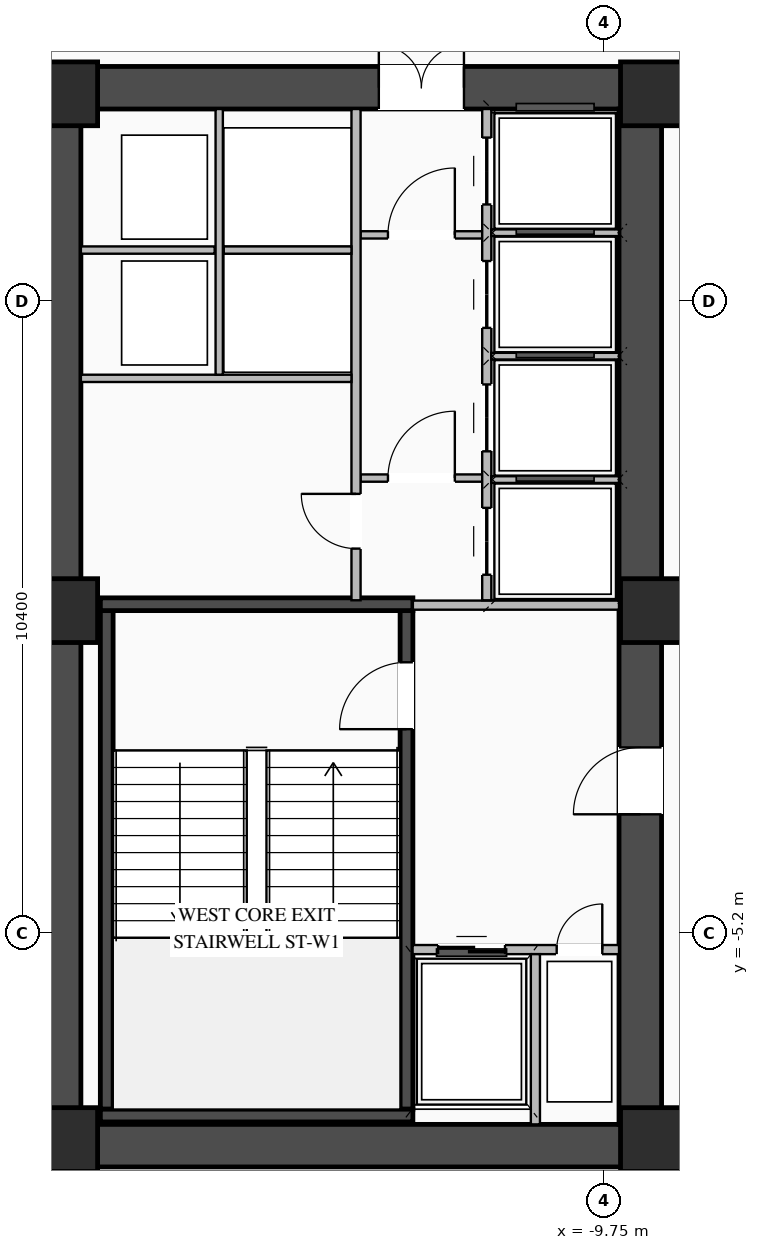
"""IFC4 building model, lengths in metres.
Left out: names, types, materials, properties, quantities, classifications, styles, units other than length and angle.
Written with IfcOpenShell. Run it as: python <this file> out.ifc"""

import sys

from ifc_helpers import new_model, si_unit, direction, frame, frame_2d, origin, origin_2d, place, context, subcontext, project, spatial, rectangle, extrude, element, fill, save


model = new_model("IFC4")
c1 = context("Model", 3, precision=1e-05, world=origin(), true_north=direction((0.0, 1.0)))
c2 = subcontext(c1, "Body", "Model", "MODEL_VIEW")
j1 = project(units=[si_unit("LENGTHUNIT", "METRE"), si_unit("PLANEANGLEUNIT", "RADIAN")], contexts=[c1])
p1 = place(None, origin())
s1 = spatial("IfcSite", under=j1, at=p1, CompositionType="ELEMENT")
p2 = place(p1, origin())
s2 = spatial("IfcBuilding", under=s1, at=p2, CompositionType="ELEMENT")
p3 = place(p2, frame((0.0, 0.0, 70.0)))
s3 = spatial("IfcBuildingStorey", under=s2, at=p3, CompositionType="ELEMENT", Elevation=70.0)
p4 = place(p3, frame((-19.05, -8.7, 0.0), z_axis=(0.0, 0.0, 1.0), x_axis=(1.0, 0.0, 0.0)))
e1 = element("IfcWall", 1, at=p4, inside=s3, PredefinedType="SHEAR", context=c2, shape_type="SweptSolid", body=[
    extrude(rectangle(XDim=10.25, YDim=0.7, at=frame_2d((5.125, 0.0))), origin(), (0.0, 0.0, 1.0), 4.02),
])
p5 = place(p3, frame((-19.05, 8.7, 0.0), z_axis=(0.0, 0.0, 1.0), x_axis=(1.0, 0.0, 0.0)))
e2 = element("IfcWall", 2, at=p5, inside=s3, PredefinedType="SHEAR", context=c2, shape_type="SweptSolid", body=[
    extrude(rectangle(XDim=10.25, YDim=0.7, at=frame_2d((5.125, 0.0))), origin(), (0.0, 0.0, 1.0), 4.02),
])
p6 = place(p5, frame((5.6, 0.0, 0.0)))
e3 = element("IfcOpeningElement", 3, at=p6, cuts=e2, PredefinedType="OPENING", context=c2, shape_type="SweptSolid", body=[
    extrude(rectangle(XDim=1.4, YDim=2.05, at=frame_2d((0.7, 1.025))), frame((0.0, 0.36, 0.0), z_axis=(0.0, -1.0, 0.0), x_axis=(1.0, 0.0, 0.0)), (0.0, 0.0, 1.0), 0.72),
])
p7 = place(p3, frame((-18.7, -8.35, 0.0), z_axis=(0.0, 0.0, 1.0), x_axis=(0.0, 1.0, 0.0)))
e4 = element("IfcWall", 4, at=p7, inside=s3, PredefinedType="SHEAR", context=c2, shape_type="SweptSolid", body=[
    extrude(rectangle(XDim=16.7, YDim=0.7, at=frame_2d((8.35, 0.0))), origin(), (0.0, 0.0, 1.0), 4.02),
])
p8 = place(p3, frame((-9.15, -8.35, 0.0), z_axis=(0.0, 0.0, 1.0), x_axis=(0.0, 1.0, 0.0)))
e5 = element("IfcWall", 5, at=p8, inside=s3, PredefinedType="SHEAR", context=c2, shape_type="SweptSolid", body=[
    extrude(rectangle(XDim=16.7, YDim=0.7, at=frame_2d((8.35, 0.0))), origin(), (0.0, 0.0, 1.0), 4.02),
])
p9 = place(p8, frame((5.1, 0.0, 0.0)))
e6 = element("IfcOpeningElement", 6, at=p9, cuts=e5, PredefinedType="OPENING", context=c2, shape_type="SweptSolid", body=[
    extrude(rectangle(XDim=1.1, YDim=2.08, at=frame_2d((0.55, 1.04))), frame((0.0, 0.36, 0.0), z_axis=(0.0, -1.0, 0.0), x_axis=(1.0, 0.0, 0.0)), (0.0, 0.0, 1.0), 0.72),
])
p10 = place(p3, frame((-12.995, -8.1, 0.0), z_axis=(0.0, 0.0, 1.0), x_axis=(0.0, 1.0, 0.0)))
e7 = element("IfcWall", 7, at=p10, inside=s3, PredefinedType="SHEAR", context=c2, shape_type="SweptSolid", body=[
    extrude(rectangle(XDim=8.2, YDim=0.21, at=frame_2d((4.1, 0.0))), origin(), (0.0, 0.0, 1.0), 4.02),
])
p11 = place(p10, frame((6.25, 0.0, 0.0)))
e8 = element("IfcOpeningElement", 8, at=p11, cuts=e7, PredefinedType="OPENING", context=c2, shape_type="SweptSolid", body=[
    extrude(rectangle(XDim=1.1, YDim=2.15, at=frame_2d((0.55, 1.075))), frame((0.0, 0.115, 0.0), z_axis=(0.0, -1.0, 0.0), x_axis=(1.0, 0.0, 0.0)), (0.0, 0.0, 1.0), 0.23),
])
p12 = place(p3, frame((-17.925, -8.1, 0.0), z_axis=(0.0, 0.0, 1.0), x_axis=(0.0, 1.0, 0.0)))
e9 = element("IfcWall", 9, at=p12, inside=s3, PredefinedType="SHEAR", context=c2, shape_type="SweptSolid", body=[
    extrude(rectangle(XDim=8.2, YDim=0.21, at=frame_2d((4.1, 0.0))), origin(), (0.0, 0.0, 1.0), 4.02),
])
for number, where, z_axis, x_axis in (
    (10, (-18.03, -8.205, 0.0), (0.0, 0.0, 1.0), (1.0, 0.0, 0.0)),
    (11, (-12.89, 0.205, 0.0), (0.0, 0.0, 1.0), (-1.0, 0.0, 0.0)),
):
    element("IfcWall", number, at=place(p3, frame(where, z_axis=z_axis, x_axis=x_axis)), inside=s3, PredefinedType="SHEAR", context=c2, shape_type="SweptSolid", body=[
        extrude(rectangle(XDim=5.14, YDim=0.21, at=frame_2d((2.57, 0.0))), origin(), (0.0, 0.0, 1.0), 4.02),
    ])
for number, where, z_axis, x_axis in (
    (12, (-8.95, -8.6, 0.0), (0.0, 0.0, 1.0), (1.0, 0.0, 0.0)),
    (13, (-8.95, 0.1, 0.0), (0.0, 0.0, 1.0), (1.0, 0.0, 0.0)),
    (14, (-8.95, 8.6, 0.0), (0.0, 0.0, 1.0), (1.0, 0.0, 0.0)),
    (15, (-18.6, -8.6, 0.0), (0.0, 0.0, 1.0), (1.0, 0.0, 0.0)),
    (16, (-18.6, 0.1, 0.0), (0.0, 0.0, 1.0), (1.0, 0.0, 0.0)),
    (17, (-18.6, 8.6, 0.0), (0.0, 0.0, 1.0), (1.0, 0.0, 0.0)),
):
    element("IfcColumn", number, at=place(p3, frame(where, z_axis=z_axis, x_axis=x_axis)), inside=s3, PredefinedType="COLUMN", context=c2, shape_type="SweptSolid", body=[
        extrude(rectangle(XDim=1.05, YDim=1.05, at=origin_2d()), origin(), (0.0, 0.0, 1.0), 4.2),
    ])
p13 = place(p3, frame((-12.895, -5.475, 0.0), z_axis=(0.0, 0.0, 1.0), x_axis=(1.0, 0.0, 0.0)))
e18 = element("IfcWall", 18, at=p13, inside=s3, PredefinedType="STANDARD", context=c2, shape_type="SweptSolid", body=[
    extrude(rectangle(XDim=3.395, YDim=0.15, at=frame_2d((1.698, 0.0))), origin(), (0.0, 0.0, 1.0), 4.0),
])
p14 = place(p13, frame((0.42, 0.0, 0.0)))
e19 = element("IfcOpeningElement", 19, at=p14, cuts=e18, PredefinedType="OPENING", context=c2, shape_type="SweptSolid", body=[
    extrude(rectangle(XDim=1.1, YDim=2.15, at=frame_2d((0.55, 1.075))), frame((0.0, 0.085, 0.0), z_axis=(0.0, -1.0, 0.0), x_axis=(1.0, 0.0, 0.0)), (0.0, 0.0, 1.0), 0.17),
])
p15 = place(p13, frame((2.37, 0.0, 0.0)))
e20 = element("IfcOpeningElement", 20, at=p15, cuts=e18, PredefinedType="OPENING", context=c2, shape_type="SweptSolid", body=[
    extrude(rectangle(XDim=0.75, YDim=2.05, at=frame_2d((0.375, 1.025))), frame((0.0, 0.085, 0.0), z_axis=(0.0, -1.0, 0.0), x_axis=(1.0, 0.0, 0.0)), (0.0, 0.0, 1.0), 0.17),
])
p16 = place(p3, frame((-10.875, -8.35, 0.0), z_axis=(0.0, 0.0, 1.0), x_axis=(0.0, 1.0, 0.0)))
e21 = element("IfcWall", 21, at=p16, inside=s3, PredefinedType="STANDARD", context=c2, shape_type="SweptSolid", body=[
    extrude(rectangle(XDim=2.8, YDim=0.15, at=frame_2d((1.4, 0.0))), origin(), (0.0, 0.0, 1.0), 4.0),
])
p17 = place(p3, frame((-12.89, 0.19, 0.0), z_axis=(0.0, 0.0, 1.0), x_axis=(1.0, 0.0, 0.0)))
e22 = element("IfcWall", 22, at=p17, inside=s3, PredefinedType="STANDARD", context=c2, shape_type="SweptSolid", body=[
    extrude(rectangle(XDim=3.39, YDim=0.15, at=frame_2d((1.695, 0.0))), origin(), (0.0, 0.0, 1.0), 3.395),
])
p18 = place(p3, frame((-13.75, 2.28, 0.0), z_axis=(0.0, 0.0, 1.0), x_axis=(1.0, 0.0, 0.0)))
e23 = element("IfcWall", 23, at=p18, inside=s3, PredefinedType="STANDARD", context=c2, shape_type="SweptSolid", body=[
    extrude(rectangle(XDim=2.0, YDim=0.12, at=frame_2d((1.0, 0.0))), origin(), (0.0, 0.0, 1.0), 4.0),
])
p19 = place(p18, frame((0.45, 0.0, 0.0)))
e24 = element("IfcOpeningElement", 24, at=p19, cuts=e23, PredefinedType="OPENING", context=c2, shape_type="SweptSolid", body=[
    extrude(rectangle(XDim=1.1, YDim=2.1, at=frame_2d((0.55, 1.05))), frame((0.0, 0.07, 0.0), z_axis=(0.0, -1.0, 0.0), x_axis=(1.0, 0.0, 0.0)), (0.0, 0.0, 1.0), 0.14),
])
p20 = place(p3, frame((-13.75, 6.28, 0.0), z_axis=(0.0, 0.0, 1.0), x_axis=(1.0, 0.0, 0.0)))
e25 = element("IfcWall", 25, at=p20, inside=s3, PredefinedType="STANDARD", context=c2, shape_type="SweptSolid", body=[
    extrude(rectangle(XDim=2.0, YDim=0.12, at=frame_2d((1.0, 0.0))), origin(), (0.0, 0.0, 1.0), 4.0),
])
p21 = place(p20, frame((0.45, 0.0, 0.0)))
e26 = element("IfcOpeningElement", 26, at=p21, cuts=e25, PredefinedType="OPENING", context=c2, shape_type="SweptSolid", body=[
    extrude(rectangle(XDim=1.1, YDim=2.1, at=frame_2d((0.55, 1.05))), frame((0.0, 0.07, 0.0), z_axis=(0.0, -1.0, 0.0), x_axis=(1.0, 0.0, 0.0)), (0.0, 0.0, 1.0), 0.14),
])
p22 = place(p3, frame((-11.675, 0.27, 0.0), z_axis=(0.0, 0.0, 1.0), x_axis=(0.0, 1.0, 0.0)))
e27 = element("IfcWall", 27, at=p22, inside=s3, PredefinedType="STANDARD", context=c2, shape_type="SweptSolid", body=[
    extrude(rectangle(XDim=8.08, YDim=0.15, at=frame_2d((4.04, 0.0))), origin(), (0.0, 0.0, 1.0), 4.0),
])
p23 = place(p22, frame((0.42, 0.0, 0.0)))
e28 = element("IfcOpeningElement", 28, at=p23, cuts=e27, PredefinedType="OPENING", context=c2, shape_type="SweptSolid", body=[
    extrude(rectangle(XDim=1.1, YDim=2.1, at=frame_2d((0.55, 1.05))), frame((0.0, 0.085, 0.0), z_axis=(0.0, -1.0, 0.0), x_axis=(1.0, 0.0, 0.0)), (0.0, 0.0, 1.0), 0.17),
])
p24 = place(p22, frame((2.45, 0.0, 0.0)))
e29 = element("IfcOpeningElement", 29, at=p24, cuts=e27, PredefinedType="OPENING", context=c2, shape_type="SweptSolid", body=[
    extrude(rectangle(XDim=1.1, YDim=2.1, at=frame_2d((0.55, 1.05))), frame((0.0, 0.085, 0.0), z_axis=(0.0, -1.0, 0.0), x_axis=(1.0, 0.0, 0.0)), (0.0, 0.0, 1.0), 0.17),
])
p25 = place(p22, frame((4.48, 0.0, 0.0)))
e30 = element("IfcOpeningElement", 30, at=p25, cuts=e27, PredefinedType="OPENING", context=c2, shape_type="SweptSolid", body=[
    extrude(rectangle(XDim=1.1, YDim=2.1, at=frame_2d((0.55, 1.05))), frame((0.0, 0.085, 0.0), z_axis=(0.0, -1.0, 0.0), x_axis=(1.0, 0.0, 0.0)), (0.0, 0.0, 1.0), 0.17),
])
p26 = place(p22, frame((6.51, 0.0, 0.0)))
e31 = element("IfcOpeningElement", 31, at=p26, cuts=e27, PredefinedType="OPENING", context=c2, shape_type="SweptSolid", body=[
    extrude(rectangle(XDim=1.1, YDim=2.1, at=frame_2d((0.55, 1.05))), frame((0.0, 0.085, 0.0), z_axis=(0.0, -1.0, 0.0), x_axis=(1.0, 0.0, 0.0)), (0.0, 0.0, 1.0), 0.17),
])
for number, where, z_axis, x_axis in (
    (32, (-11.6, 2.255, 0.0), (0.0, 0.0, 1.0), (1.0, 0.0, 0.0)),
    (33, (-11.6, 4.285, 0.0), (0.0, 0.0, 1.0), (1.0, 0.0, 0.0)),
    (34, (-11.6, 6.315, 0.0), (0.0, 0.0, 1.0), (1.0, 0.0, 0.0)),
):
    element("IfcWall", number, at=place(p3, frame(where, z_axis=z_axis, x_axis=x_axis)), inside=s3, PredefinedType="STANDARD", context=c2, shape_type="SweptSolid", body=[
        extrude(rectangle(XDim=2.1, YDim=0.11, at=frame_2d((1.05, 0.0))), origin(), (0.0, 0.0, 1.0), 4.0),
    ])
p27 = place(p3, frame((-13.825, 0.27, 0.0), z_axis=(0.0, 0.0, 1.0), x_axis=(0.0, 1.0, 0.0)))
e35 = element("IfcWall", 35, at=p27, inside=s3, PredefinedType="STANDARD", context=c2, shape_type="SweptSolid", body=[
    extrude(rectangle(XDim=8.08, YDim=0.15, at=frame_2d((4.04, 0.0))), origin(), (0.0, 0.0, 1.0), 4.0),
])
p28 = place(p27, frame((0.85, 0.0, 0.0)))
e36 = element("IfcOpeningElement", 36, at=p28, cuts=e35, PredefinedType="OPENING", context=c2, shape_type="SweptSolid", body=[
    extrude(rectangle(XDim=0.9, YDim=2.05, at=frame_2d((0.45, 1.025))), frame((0.0, 0.085, 0.0), z_axis=(0.0, -1.0, 0.0), x_axis=(1.0, 0.0, 0.0)), (0.0, 0.0, 1.0), 0.17),
])
p29 = place(p3, frame((-18.35, 3.92, 0.0), z_axis=(0.0, 0.0, 1.0), x_axis=(1.0, 0.0, 0.0)))
e37 = element("IfcWall", 37, at=p29, inside=s3, PredefinedType="STANDARD", context=c2, shape_type="SweptSolid", body=[
    extrude(rectangle(XDim=4.45, YDim=0.12, at=frame_2d((2.225, 0.0))), origin(), (0.0, 0.0, 1.0), 4.0),
])
p30 = place(p3, frame((-18.35, 6.03, 0.0), z_axis=(0.0, 0.0, 1.0), x_axis=(1.0, 0.0, 0.0)))
e38 = element("IfcWall", 38, at=p30, inside=s3, PredefinedType="STANDARD", context=c2, shape_type="SweptSolid", body=[
    extrude(rectangle(XDim=2.2, YDim=0.12, at=frame_2d((1.1, 0.0))), origin(), (0.0, 0.0, 1.0), 4.0),
])
p31 = place(p3, frame((-16.075, 3.98, 0.0), z_axis=(0.0, 0.0, 1.0), x_axis=(0.0, 1.0, 0.0)))
e39 = element("IfcWall", 39, at=p31, inside=s3, PredefinedType="STANDARD", context=c2, shape_type="SweptSolid", body=[
    extrude(rectangle(XDim=4.37, YDim=0.12, at=frame_2d((2.185, 0.0))), origin(), (0.0, 0.0, 1.0), 4.0),
])
p32 = place(p3, frame((-16.0, 6.03, 0.0), z_axis=(0.0, 0.0, 1.0), x_axis=(1.0, 0.0, 0.0)))
e40 = element("IfcWall", 40, at=p32, inside=s3, PredefinedType="STANDARD", context=c2, shape_type="SweptSolid", body=[
    extrude(rectangle(XDim=2.1, YDim=0.12, at=frame_2d((1.05, 0.0))), origin(), (0.0, 0.0, 1.0), 4.0),
])
p33 = place(p11, origin())
e41 = element("IfcDoor", 41, at=p33, inside=s3, OperationType="SINGLE_SWING_LEFT", PredefinedType="DOOR", context=c2, shape_type="SweptSolid", body=[
    extrude(rectangle(XDim=1.1, YDim=2.15, at=frame_2d((0.55, 1.075))), frame((0.0, 0.025, 0.0), z_axis=(0.0, -1.0, 0.0), x_axis=(1.0, 0.0, 0.0)), (0.0, 0.0, 1.0), 0.05),
])
fill(e8, e41)
p34 = place(p14, origin())
e42 = element("IfcDoor", 42, at=p34, inside=s3, OperationType="DOUBLE_DOOR_SLIDING", PredefinedType="DOOR", context=c2, shape_type="SweptSolid", body=[
    extrude(rectangle(XDim=1.1, YDim=2.15, at=frame_2d((0.55, 1.075))), frame((0.0, 0.025, 0.0), z_axis=(0.0, -1.0, 0.0), x_axis=(1.0, 0.0, 0.0)), (0.0, 0.0, 1.0), 0.05),
])
fill(e19, e42)
p35 = place(p15, origin())
e43 = element("IfcDoor", 43, at=p35, inside=s3, OperationType="SINGLE_SWING_RIGHT", PredefinedType="DOOR", context=c2, shape_type="SweptSolid", body=[
    extrude(rectangle(XDim=0.75, YDim=2.05, at=frame_2d((0.375, 1.025))), frame((0.0, 0.025, 0.0), z_axis=(0.0, -1.0, 0.0), x_axis=(1.0, 0.0, 0.0)), (0.0, 0.0, 1.0), 0.05),
])
fill(e20, e43)
p36 = place(p9, origin())
e44 = element("IfcDoor", 44, at=p36, inside=s3, OperationType="SINGLE_SWING_LEFT", PredefinedType="DOOR", context=c2, shape_type="SweptSolid", body=[
    extrude(rectangle(XDim=1.1, YDim=2.08, at=frame_2d((0.55, 1.04))), frame((0.0, 0.305, 0.0), z_axis=(0.0, -1.0, 0.0), x_axis=(1.0, 0.0, 0.0)), (0.0, 0.0, 1.0), 0.05),
])
fill(e6, e44)
p37 = place(p19, origin())
e45 = element("IfcDoor", 45, at=p37, inside=s3, OperationType="SINGLE_SWING_RIGHT", PredefinedType="DOOR", context=c2, shape_type="SweptSolid", body=[
    extrude(rectangle(XDim=1.1, YDim=2.1, at=frame_2d((0.55, 1.05))), frame((0.0, 0.025, 0.0), z_axis=(0.0, -1.0, 0.0), x_axis=(1.0, 0.0, 0.0)), (0.0, 0.0, 1.0), 0.05),
])
fill(e24, e45)
p38 = place(p21, origin())
e46 = element("IfcDoor", 46, at=p38, inside=s3, OperationType="SINGLE_SWING_RIGHT", PredefinedType="DOOR", context=c2, shape_type="SweptSolid", body=[
    extrude(rectangle(XDim=1.1, YDim=2.1, at=frame_2d((0.55, 1.05))), frame((0.0, 0.025, 0.0), z_axis=(0.0, -1.0, 0.0), x_axis=(1.0, 0.0, 0.0)), (0.0, 0.0, 1.0), 0.05),
])
fill(e26, e46)
p39 = place(p6, origin())
e47 = element("IfcDoor", 47, at=p39, inside=s3, OperationType="DOUBLE_DOOR_SINGLE_SWING", PredefinedType="DOOR", context=c2, shape_type="SweptSolid", body=[
    extrude(rectangle(XDim=1.4, YDim=2.05, at=frame_2d((0.7, 1.025))), frame((0.0, 0.295, 0.0), z_axis=(0.0, -1.0, 0.0), x_axis=(1.0, 0.0, 0.0)), (0.0, 0.0, 1.0), 0.05),
])
fill(e3, e47)
p40 = place(p23, origin())
e48 = element("IfcDoor", 48, at=p40, inside=s3, OperationType="DOUBLE_DOOR_SLIDING", PredefinedType="DOOR", context=c2, shape_type="SweptSolid", body=[
    extrude(rectangle(XDim=1.1, YDim=2.1, at=frame_2d((0.55, 1.05))), frame((0.0, 0.025, 0.0), z_axis=(0.0, -1.0, 0.0), x_axis=(1.0, 0.0, 0.0)), (0.0, 0.0, 1.0), 0.05),
])
fill(e28, e48)
p41 = place(p24, origin())
e49 = element("IfcDoor", 49, at=p41, inside=s3, OperationType="DOUBLE_DOOR_SLIDING", PredefinedType="DOOR", context=c2, shape_type="SweptSolid", body=[
    extrude(rectangle(XDim=1.1, YDim=2.1, at=frame_2d((0.55, 1.05))), frame((0.0, 0.025, 0.0), z_axis=(0.0, -1.0, 0.0), x_axis=(1.0, 0.0, 0.0)), (0.0, 0.0, 1.0), 0.05),
])
fill(e29, e49)
p42 = place(p25, origin())
e50 = element("IfcDoor", 50, at=p42, inside=s3, OperationType="DOUBLE_DOOR_SLIDING", PredefinedType="DOOR", context=c2, shape_type="SweptSolid", body=[
    extrude(rectangle(XDim=1.1, YDim=2.1, at=frame_2d((0.55, 1.05))), frame((0.0, 0.025, 0.0), z_axis=(0.0, -1.0, 0.0), x_axis=(1.0, 0.0, 0.0)), (0.0, 0.0, 1.0), 0.05),
])
fill(e30, e50)
p43 = place(p26, origin())
e51 = element("IfcDoor", 51, at=p43, inside=s3, OperationType="DOUBLE_DOOR_SLIDING", PredefinedType="DOOR", context=c2, shape_type="SweptSolid", body=[
    extrude(rectangle(XDim=1.1, YDim=2.1, at=frame_2d((0.55, 1.05))), frame((0.0, 0.025, 0.0), z_axis=(0.0, -1.0, 0.0), x_axis=(1.0, 0.0, 0.0)), (0.0, 0.0, 1.0), 0.05),
])
fill(e31, e51)
p44 = place(p28, origin())
e52 = element("IfcDoor", 52, at=p44, inside=s3, OperationType="SINGLE_SWING_RIGHT", PredefinedType="DOOR", context=c2, shape_type="SweptSolid", body=[
    extrude(rectangle(XDim=0.9, YDim=2.05, at=frame_2d((0.45, 1.025))), frame((0.0, 0.025, 0.0), z_axis=(0.0, -1.0, 0.0), x_axis=(1.0, 0.0, 0.0)), (0.0, 0.0, 1.0), 0.05),
])
fill(e36, e52)
save(model, sys.argv[1])
